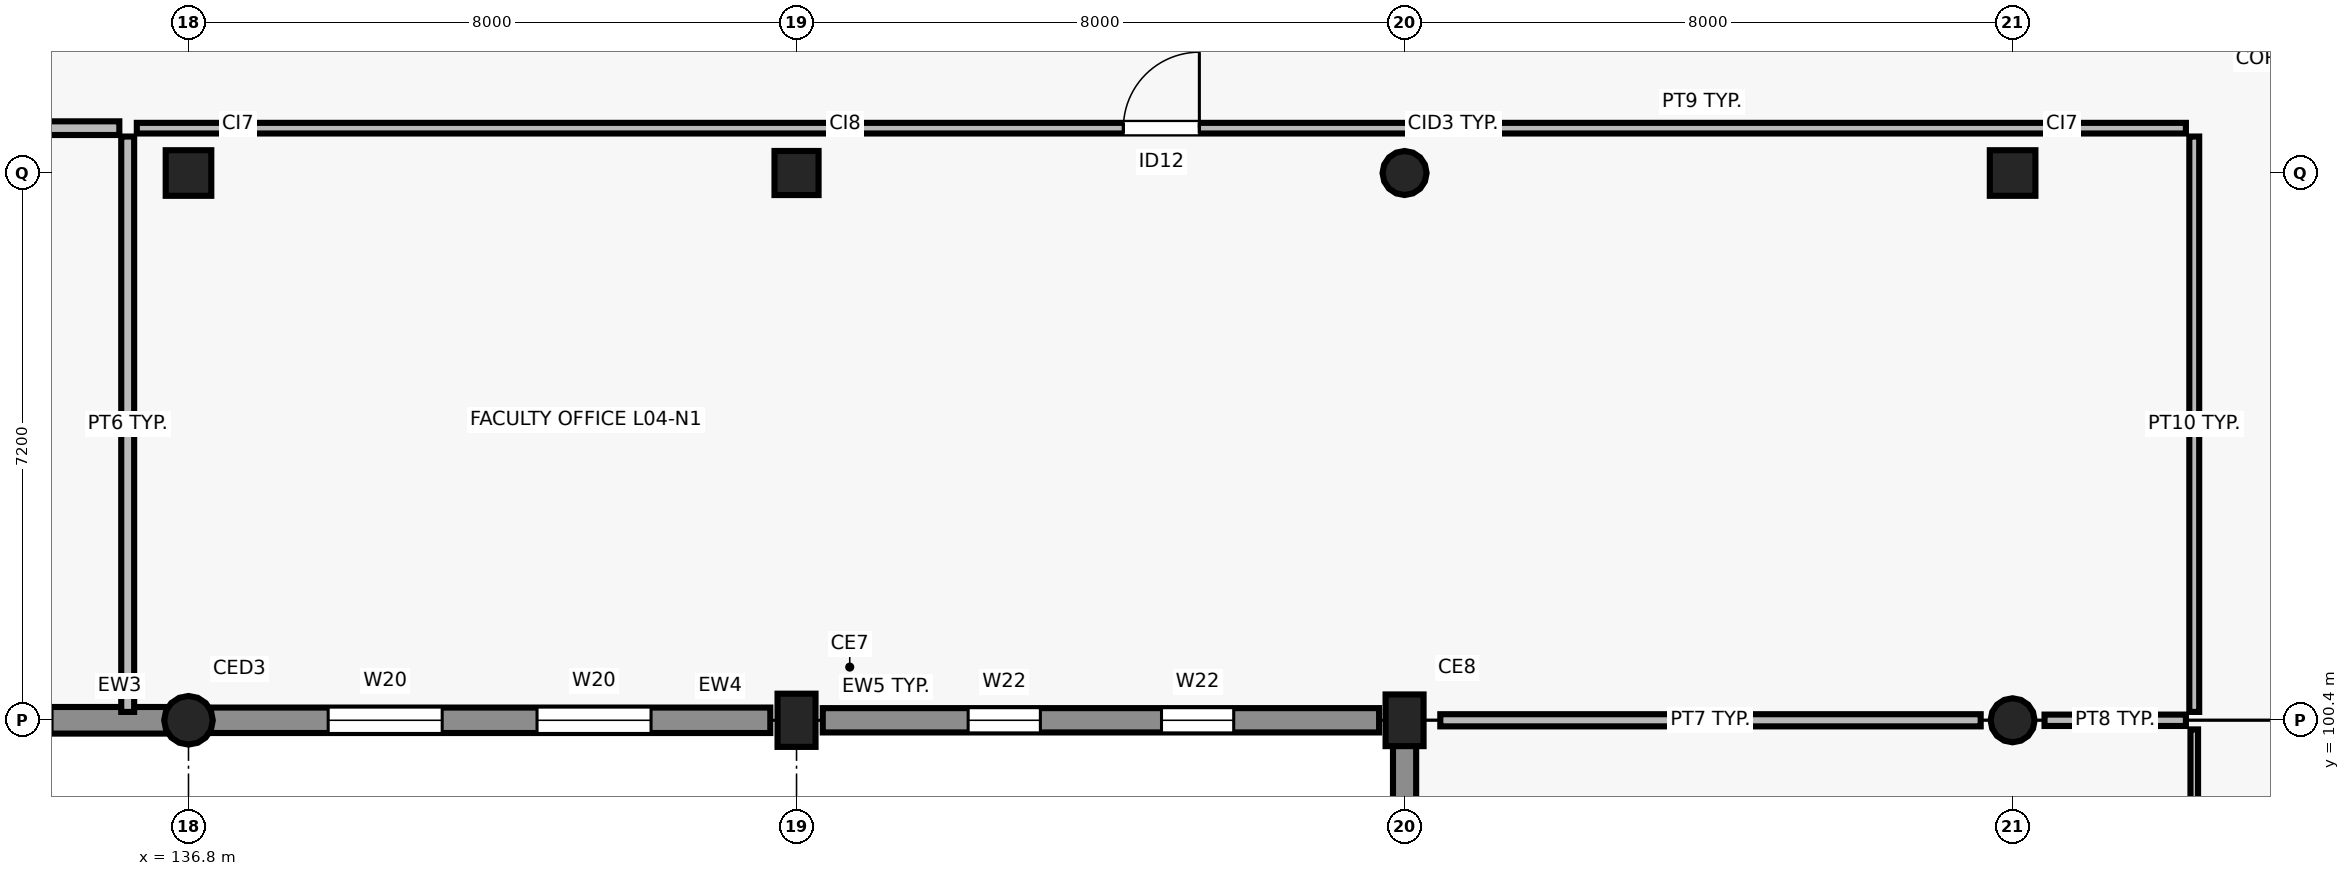
"""IFC4 building model, lengths in metres.
Left out: names, types, materials, properties, quantities, classifications, styles, units other than length and angle.
Written with IfcOpenShell. Run it as: python <this file> out.ifc"""

import sys

from ifc_helpers import new_model, si_unit, direction, frame, frame_2d, origin, origin_2d, place, context, subcontext, project, spatial, rectangle, circle, extrude, element, fill, save


model = new_model("IFC4")
c1 = context("Model", 3, precision=1e-05, world=origin(), true_north=direction((0.0, 1.0)))
c2 = subcontext(c1, "Body", "Model", "MODEL_VIEW")
j1 = project(units=[si_unit("LENGTHUNIT", "METRE"), si_unit("PLANEANGLEUNIT", "RADIAN")], contexts=[c1])
p1 = place(None, origin())
s1 = spatial("IfcSite", under=j1, at=p1, CompositionType="ELEMENT")
p2 = place(p1, origin())
s2 = spatial("IfcBuilding", under=s1, at=p2, CompositionType="ELEMENT")
p3 = place(p2, frame((0.0, 0.0, 17.4)))
s3 = spatial("IfcBuildingStorey", under=s2, at=p3, CompositionType="ELEMENT", Elevation=17.4)
p4 = place(p3, frame((136.8, 100.4, 0.0), z_axis=(0.0, 0.0, 1.0), x_axis=(1.0, 0.0, 0.0)))
e1 = element("IfcColumn", 1, at=p4, inside=s3, PredefinedType="COLUMN", context=c2, shape_type="SweptSolid", body=[
    extrude(circle(Radius=0.32, at=origin_2d()), origin(), (0.0, 0.0, 1.0), 4.2),
])
p5 = place(p3, frame((136.8, 107.6, 0.0), z_axis=(0.0, 0.0, 1.0), x_axis=(1.0, 0.0, 0.0)))
e2 = element("IfcColumn", 2, at=p5, inside=s3, PredefinedType="COLUMN", context=c2, shape_type="SweptSolid", body=[
    extrude(rectangle(XDim=0.6, YDim=0.6, at=origin_2d()), origin(), (0.0, 0.0, 1.0), 4.2),
])
p6 = place(p3, frame((144.8, 100.4, 0.0), z_axis=(0.0, 0.0, 1.0), x_axis=(1.0, 0.0, 0.0)))
e3 = element("IfcColumn", 3, at=p6, inside=s3, PredefinedType="COLUMN", context=c2, shape_type="SweptSolid", body=[
    extrude(rectangle(XDim=0.7, YDim=0.5, at=origin_2d()), origin(), (0.0, 0.0, 1.0), 4.2),
])
p7 = place(p3, frame((144.8, 107.6, 0.0), z_axis=(0.0, 0.0, 1.0), x_axis=(1.0, 0.0, 0.0)))
e4 = element("IfcColumn", 4, at=p7, inside=s3, PredefinedType="COLUMN", context=c2, shape_type="SweptSolid", body=[
    extrude(rectangle(XDim=0.58, YDim=0.58, at=origin_2d()), origin(), (0.0, 0.0, 1.0), 4.2),
])
p8 = place(p3, frame((152.8, 100.4, 0.0), z_axis=(0.0, 0.0, 1.0), x_axis=(1.0, 0.0, 0.0)))
e5 = element("IfcColumn", 5, at=p8, inside=s3, PredefinedType="COLUMN", context=c2, shape_type="SweptSolid", body=[
    extrude(rectangle(XDim=0.68, YDim=0.5, at=origin_2d()), origin(), (0.0, 0.0, 1.0), 4.2),
])
for number, where, z_axis, x_axis in (
    (6, (152.8, 107.6, 0.0), (0.0, 0.0, 1.0), (1.0, 0.0, 0.0)),
    (7, (160.8, 100.4, 0.0), (0.0, 0.0, 1.0), (1.0, 0.0, 0.0)),
):
    element("IfcColumn", number, at=place(p3, frame(where, z_axis=z_axis, x_axis=x_axis)), inside=s3, PredefinedType="COLUMN", context=c2, shape_type="SweptSolid", body=[
        extrude(circle(Radius=0.29, at=origin_2d()), origin(), (0.0, 0.0, 1.0), 4.2),
    ])
p9 = place(p3, frame((160.8, 107.6, 0.0), z_axis=(0.0, 0.0, 1.0), x_axis=(1.0, 0.0, 0.0)))
e8 = element("IfcColumn", 8, at=p9, inside=s3, PredefinedType="COLUMN", context=c2, shape_type="SweptSolid", body=[
    extrude(rectangle(XDim=0.6, YDim=0.6, at=origin_2d()), origin(), (0.0, 0.0, 1.0), 4.2),
])
p10 = place(p3, frame((129.135, 100.4, 0.0), z_axis=(0.0, 0.0, 1.0), x_axis=(1.0, 0.0, 0.0)))
e9 = element("IfcWall", 9, at=p10, inside=s3, PredefinedType="SOLIDWALL", context=c2, shape_type="SweptSolid", body=[
    extrude(rectangle(XDim=7.396, YDim=0.35, at=frame_2d((3.698, 0.0))), origin(), (0.0, 0.0, 1.0), 3.42),
])
p11 = place(p10, frame((0.995, 0.0, 0.9)))
e10 = element("IfcOpeningElement", 10, at=p11, cuts=e9, PredefinedType="OPENING", context=c2, shape_type="SweptSolid", body=[
    extrude(rectangle(XDim=2.1, YDim=1.25, at=frame_2d((1.05, 0.625))), frame((0.0, 0.185, 0.0), z_axis=(0.0, -1.0, 0.0), x_axis=(1.0, 0.0, 0.0)), (0.0, 0.0, 1.0), 0.37),
])
p12 = place(p10, frame((3.77, 0.0, 0.9)))
e11 = element("IfcOpeningElement", 11, at=p12, cuts=e9, PredefinedType="OPENING", context=c2, shape_type="SweptSolid", body=[
    extrude(rectangle(XDim=2.1, YDim=1.25, at=frame_2d((1.05, 0.625))), frame((0.0, 0.185, 0.0), z_axis=(0.0, -1.0, 0.0), x_axis=(1.0, 0.0, 0.0)), (0.0, 0.0, 1.0), 0.37),
])
p13 = place(p3, frame((137.069, 100.4, 0.0), z_axis=(0.0, 0.0, 1.0), x_axis=(1.0, 0.0, 0.0)))
e12 = element("IfcWall", 12, at=p13, inside=s3, PredefinedType="SOLIDWALL", context=c2, shape_type="SweptSolid", body=[
    extrude(rectangle(XDim=7.386, YDim=0.335, at=frame_2d((3.693, 0.0))), origin(), (0.0, 0.0, 1.0), 3.37),
])
p14 = place(p13, frame((1.569, 0.0, 0.9)))
e13 = element("IfcOpeningElement", 13, at=p14, cuts=e12, PredefinedType="OPENING", context=c2, shape_type="SweptSolid", body=[
    extrude(rectangle(XDim=1.5, YDim=1.25, at=frame_2d((0.75, 0.625))), frame((0.0, 0.177, 0.0), z_axis=(0.0, -1.0, 0.0), x_axis=(1.0, 0.0, 0.0)), (0.0, 0.0, 1.0), 0.355),
])
p15 = place(p13, frame((4.317, 0.0, 0.9)))
e14 = element("IfcOpeningElement", 14, at=p15, cuts=e12, PredefinedType="OPENING", context=c2, shape_type="SweptSolid", body=[
    extrude(rectangle(XDim=1.5, YDim=1.25, at=frame_2d((0.75, 0.625))), frame((0.0, 0.177, 0.0), z_axis=(0.0, -1.0, 0.0), x_axis=(1.0, 0.0, 0.0)), (0.0, 0.0, 1.0), 0.355),
])
p16 = place(p3, frame((145.145, 100.4, 0.0), z_axis=(0.0, 0.0, 1.0), x_axis=(1.0, 0.0, 0.0)))
e15 = element("IfcWall", 15, at=p16, inside=s3, PredefinedType="SOLIDWALL", context=c2, shape_type="SweptSolid", body=[
    extrude(rectangle(XDim=7.32, YDim=0.32, at=frame_2d((3.66, 0.0))), origin(), (0.0, 0.0, 1.0), 3.29),
])
p17 = place(p16, frame((1.913, 0.0, 0.9)))
e16 = element("IfcOpeningElement", 16, at=p17, cuts=e15, PredefinedType="OPENING", context=c2, shape_type="SweptSolid", body=[
    extrude(rectangle(XDim=0.95, YDim=1.25, at=frame_2d((0.475, 0.625))), frame((0.0, 0.17, 0.0), z_axis=(0.0, -1.0, 0.0), x_axis=(1.0, 0.0, 0.0)), (0.0, 0.0, 1.0), 0.34),
])
p18 = place(p16, frame((4.457, 0.0, 0.9)))
e17 = element("IfcOpeningElement", 17, at=p18, cuts=e15, PredefinedType="OPENING", context=c2, shape_type="SweptSolid", body=[
    extrude(rectangle(XDim=0.95, YDim=1.25, at=frame_2d((0.475, 0.625))), frame((0.0, 0.17, 0.0), z_axis=(0.0, -1.0, 0.0), x_axis=(1.0, 0.0, 0.0)), (0.0, 0.0, 1.0), 0.34),
])
p19 = place(p3, frame((152.8, 100.155, 0.0), z_axis=(0.0, 0.0, 1.0), x_axis=(0.0, -1.0, 0.0)))
e18 = element("IfcWall", 18, at=p19, inside=s3, PredefinedType="SOLIDWALL", context=c2, shape_type="SweptSolid", body=[
    extrude(rectangle(XDim=6.71, YDim=0.305, at=frame_2d((3.355, 0.0))), origin(), (0.0, 0.0, 1.0), 3.35),
])
p20 = place(p19, frame((2.055, 0.0, 0.9)))
e19 = element("IfcOpeningElement", 19, at=p20, cuts=e18, PredefinedType="OPENING", context=c2, shape_type="SweptSolid", body=[
    extrude(rectangle(XDim=2.6, YDim=1.65, at=frame_2d((1.3, 0.825))), frame((0.0, 0.162, 0.0), z_axis=(0.0, -1.0, 0.0), x_axis=(1.0, 0.0, 0.0)), (0.0, 0.0, 1.0), 0.325),
])
p21 = place(p3, frame((120.8, 108.19, 0.0), z_axis=(0.0, 0.0, 1.0), x_axis=(1.0, 0.0, 0.0)))
e20 = element("IfcWall", 20, at=p21, inside=s3, PredefinedType="PARTITIONING", context=c2, shape_type="SweptSolid", body=[
    extrude(rectangle(XDim=15.09, YDim=0.18, at=frame_2d((7.545, 0.0))), origin(), (0.0, 0.0, 1.0), 3.9),
])
p22 = place(p3, frame((136.0, 100.51, 0.0), z_axis=(0.0, 0.0, 1.0), x_axis=(0.0, 1.0, 0.0)))
e21 = element("IfcWall", 21, at=p22, inside=s3, PredefinedType="PARTITIONING", context=c2, shape_type="SweptSolid", body=[
    extrude(rectangle(XDim=7.57, YDim=0.17, at=frame_2d((3.785, 0.0))), origin(), (0.0, 0.0, 1.0), 3.9),
])
p23 = place(p3, frame((153.27, 100.4, 0.0), z_axis=(0.0, 0.0, 1.0), x_axis=(1.0, 0.0, 0.0)))
e22 = element("IfcWall", 22, at=p23, inside=s3, PredefinedType="PARTITIONING", context=c2, shape_type="SweptSolid", body=[
    extrude(rectangle(XDim=7.11, YDim=0.16, at=frame_2d((3.555, 0.0))), origin(), (0.0, 0.0, 1.0), 3.31),
])
p24 = place(p3, frame((161.22, 100.4, 0.0), z_axis=(0.0, 0.0, 1.0), x_axis=(1.0, 0.0, 0.0)))
e23 = element("IfcWall", 23, at=p24, inside=s3, PredefinedType="PARTITIONING", context=c2, shape_type="SweptSolid", body=[
    extrude(rectangle(XDim=1.86, YDim=0.15, at=frame_2d((0.93, 0.0))), origin(), (0.0, 0.0, 1.0), 3.32),
])
p25 = place(p3, frame((136.12, 108.19, 0.0), z_axis=(0.0, 0.0, 1.0), x_axis=(1.0, 0.0, 0.0)))
e24 = element("IfcWall", 24, at=p25, inside=s3, PredefinedType="PARTITIONING", context=c2, shape_type="SweptSolid", body=[
    extrude(rectangle(XDim=26.96, YDim=0.14, at=frame_2d((13.48, 0.0))), origin(), (0.0, 0.0, 1.0), 3.9),
])
p26 = place(p25, frame((12.98, 0.0, 0.0)))
e25 = element("IfcOpeningElement", 25, at=p26, cuts=e24, PredefinedType="OPENING", context=c2, shape_type="SweptSolid", body=[
    extrude(rectangle(XDim=1.0, YDim=2.15, at=frame_2d((0.5, 1.075))), frame((0.0, 0.08, 0.0), z_axis=(0.0, -1.0, 0.0), x_axis=(1.0, 0.0, 0.0)), (0.0, 0.0, 1.0), 0.16),
])
p27 = place(p3, frame((163.19, 100.51, 0.0), z_axis=(0.0, 0.0, 1.0), x_axis=(0.0, 1.0, 0.0)))
e26 = element("IfcWall", 26, at=p27, inside=s3, PredefinedType="PARTITIONING", context=c2, shape_type="SweptSolid", body=[
    extrude(rectangle(XDim=7.57, YDim=0.13, at=frame_2d((3.785, 0.0))), origin(), (0.0, 0.0, 1.0), 3.9),
])
p28 = place(p3, frame((163.19, 68.12, 0.0), z_axis=(0.0, 0.0, 1.0), x_axis=(0.0, 1.0, 0.0)))
e27 = element("IfcWall", 27, at=p28, inside=s3, PredefinedType="PARTITIONING", context=c2, shape_type="SweptSolid", body=[
    extrude(rectangle(XDim=32.16, YDim=0.1, at=frame_2d((16.08, 0.0))), origin(), (0.0, 0.0, 1.0), 3.9),
])
p29 = place(p28, frame((15.52, 0.0, 0.0)))
e28 = element("IfcOpeningElement", 28, at=p29, cuts=e27, PredefinedType="OPENING", context=c2, shape_type="SweptSolid", body=[
    extrude(rectangle(XDim=1.12, YDim=2.2, at=frame_2d((0.56, 1.1))), frame((0.0, 0.06, 0.0), z_axis=(0.0, -1.0, 0.0), x_axis=(1.0, 0.0, 0.0)), (0.0, 0.0, 1.0), 0.12),
])
p30 = place(p14, origin())
e29 = element("IfcWindow", 29, at=p30, inside=s3, PartitioningType="SINGLE_PANEL", PredefinedType="WINDOW", context=c2, shape_type="SweptSolid", body=[
    extrude(rectangle(XDim=1.5, YDim=1.25, at=frame_2d((0.75, 0.625))), frame((0.0, 0.03, 0.0), z_axis=(0.0, -1.0, 0.0), x_axis=(1.0, 0.0, 0.0)), (0.0, 0.0, 1.0), 0.06),
])
fill(e13, e29)
p31 = place(p15, origin())
e30 = element("IfcWindow", 30, at=p31, inside=s3, PartitioningType="SINGLE_PANEL", PredefinedType="WINDOW", context=c2, shape_type="SweptSolid", body=[
    extrude(rectangle(XDim=1.5, YDim=1.25, at=frame_2d((0.75, 0.625))), frame((0.0, 0.03, 0.0), z_axis=(0.0, -1.0, 0.0), x_axis=(1.0, 0.0, 0.0)), (0.0, 0.0, 1.0), 0.06),
])
fill(e14, e30)
p32 = place(p17, origin())
e31 = element("IfcWindow", 31, at=p32, inside=s3, PartitioningType="SINGLE_PANEL", PredefinedType="WINDOW", context=c2, shape_type="SweptSolid", body=[
    extrude(rectangle(XDim=0.95, YDim=1.25, at=frame_2d((0.475, 0.625))), frame((0.0, 0.03, 0.0), z_axis=(0.0, -1.0, 0.0), x_axis=(1.0, 0.0, 0.0)), (0.0, 0.0, 1.0), 0.06),
])
fill(e16, e31)
p33 = place(p18, origin())
e32 = element("IfcWindow", 32, at=p33, inside=s3, PartitioningType="SINGLE_PANEL", PredefinedType="WINDOW", context=c2, shape_type="SweptSolid", body=[
    extrude(rectangle(XDim=0.95, YDim=1.25, at=frame_2d((0.475, 0.625))), frame((0.0, 0.03, 0.0), z_axis=(0.0, -1.0, 0.0), x_axis=(1.0, 0.0, 0.0)), (0.0, 0.0, 1.0), 0.06),
])
fill(e17, e32)
p34 = place(p26, origin())
e33 = element("IfcDoor", 33, at=p34, inside=s3, OperationType="SINGLE_SWING_RIGHT", PredefinedType="DOOR", context=c2, shape_type="SweptSolid", body=[
    extrude(rectangle(XDim=1.0, YDim=2.15, at=frame_2d((0.5, 1.075))), frame((0.0, 0.025, 0.0), z_axis=(0.0, -1.0, 0.0), x_axis=(1.0, 0.0, 0.0)), (0.0, 0.0, 1.0), 0.05),
])
fill(e25, e33)
save(model, sys.argv[1])
